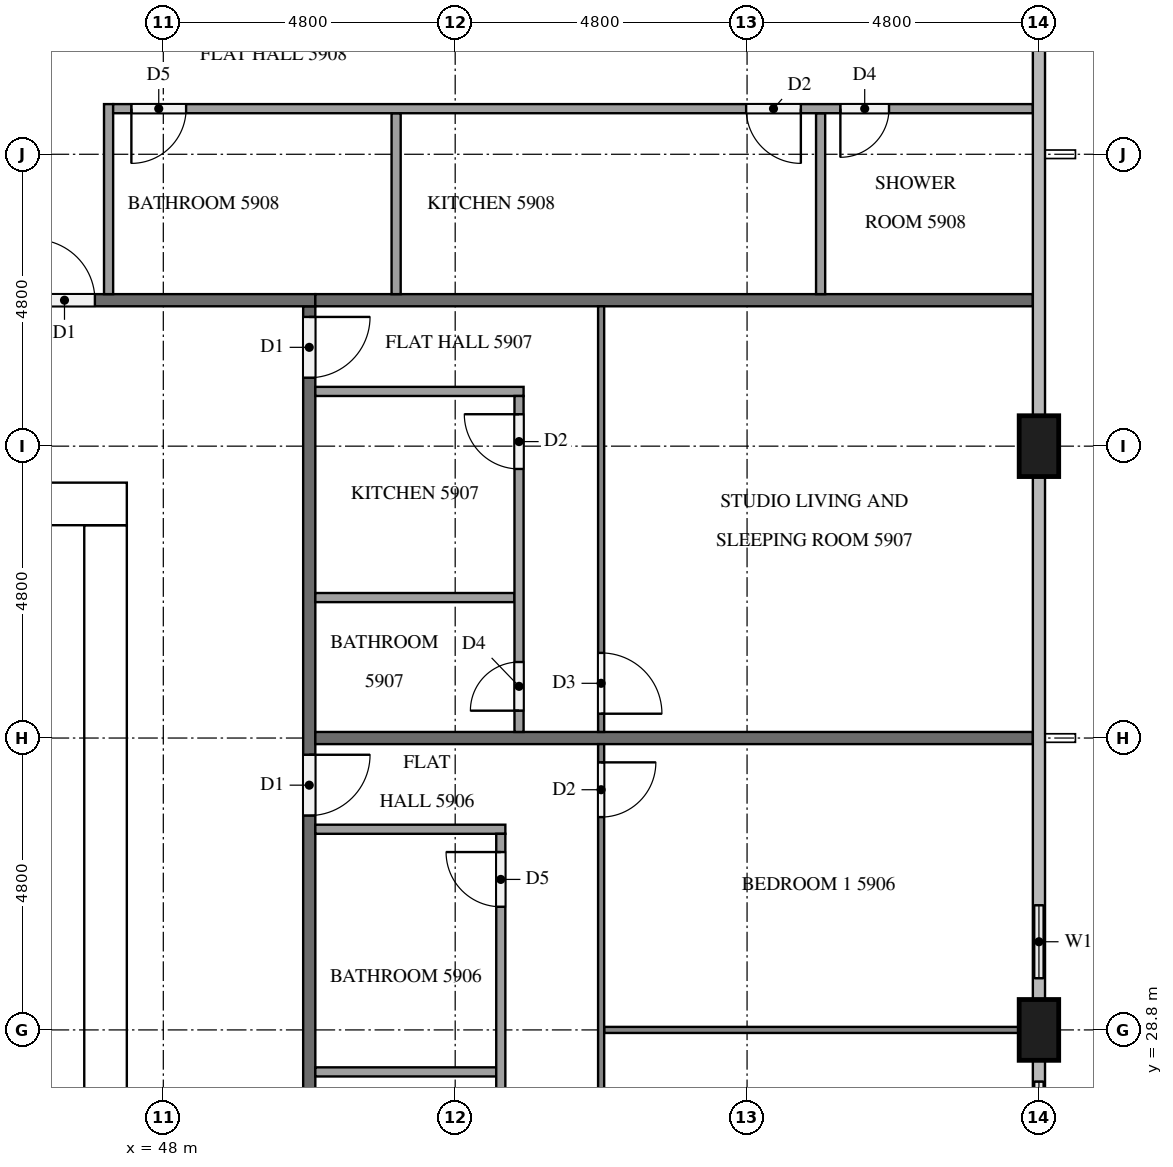
"""IFC4 building model, lengths in metres.
Left out: names, types, materials, properties, quantities, classifications, styles, units other than length and angle.
Written with IfcOpenShell. Run it as: python <this file> out.ifc"""

import sys

from ifc_helpers import new_model, si_unit, direction, frame, frame_2d, origin, origin_2d, place, context, subcontext, project, spatial, rectangle, extrude, element, fill, save


model = new_model("IFC4")
c1 = context("Model", 3, precision=1e-05, world=origin(), true_north=direction((0.0, 1.0)))
c2 = subcontext(c1, "Body", "Model", "MODEL_VIEW")
j1 = project(units=[si_unit("LENGTHUNIT", "METRE"), si_unit("PLANEANGLEUNIT", "RADIAN")], contexts=[c1])
p1 = place(None, origin())
s1 = spatial("IfcSite", under=j1, at=p1, CompositionType="ELEMENT")
p2 = place(p1, origin())
s2 = spatial("IfcBuilding", under=s1, at=p2, CompositionType="ELEMENT")
p3 = place(p2, frame((0.0, 0.0, 226.3)))
s3 = spatial("IfcBuildingStorey", under=s2, at=p3, CompositionType="ELEMENT", Elevation=226.3)
p4 = place(p3, frame((15.0, 37.45, 0.0), z_axis=(0.0, 0.0, 1.0), x_axis=(1.0, 0.0, 0.0)))
e1 = element("IfcWall", 1, at=p4, inside=s3, PredefinedType="SHEAR", context=c2, shape_type="SweptSolid", body=[
    extrude(rectangle(XDim=32.4, YDim=0.7, at=frame_2d((16.2, 0.0))), origin(), (0.0, 0.0, 1.0), 3.2),
])
p5 = place(p4, frame((15.3, 0.0, 0.0)))
e2 = element("IfcOpeningElement", 2, at=p5, cuts=e1, PredefinedType="OPENING", context=c2, shape_type="SweptSolid", body=[
    extrude(rectangle(XDim=1.8, YDim=2.1, at=frame_2d((0.9, 1.05))), frame((0.0, 0.36, 0.0), z_axis=(0.0, -1.0, 0.0), x_axis=(1.0, 0.0, 0.0)), (0.0, 0.0, 1.0), 0.72),
])
p6 = place(p4, frame((1.544, 0.0, 0.0)))
e3 = element("IfcOpeningElement", 3, at=p6, cuts=e1, PredefinedType="OPENING", context=c2, shape_type="SweptSolid", body=[
    extrude(rectangle(XDim=1.0, YDim=2.1, at=frame_2d((0.5, 1.05))), frame((0.0, 0.36, 0.0), z_axis=(0.0, -1.0, 0.0), x_axis=(1.0, 0.0, 0.0)), (0.0, 0.0, 1.0), 0.72),
])
p7 = place(p4, frame((5.219, 0.0, 0.0)))
e4 = element("IfcOpeningElement", 4, at=p7, cuts=e1, PredefinedType="OPENING", context=c2, shape_type="SweptSolid", body=[
    extrude(rectangle(XDim=1.0, YDim=2.1, at=frame_2d((0.5, 1.05))), frame((0.0, 0.36, 0.0), z_axis=(0.0, -1.0, 0.0), x_axis=(1.0, 0.0, 0.0)), (0.0, 0.0, 1.0), 0.72),
])
p8 = place(p3, frame((47.05, 15.7, 0.0), z_axis=(0.0, 0.0, 1.0), x_axis=(0.0, 1.0, 0.0)))
e5 = element("IfcWall", 5, at=p8, inside=s3, PredefinedType="SHEAR", context=c2, shape_type="SweptSolid", body=[
    extrude(rectangle(XDim=21.4, YDim=0.7, at=frame_2d((10.7, 0.0))), origin(), (0.0, 0.0, 1.0), 3.2),
])
p9 = place(p8, frame((10.4, 0.0, 0.0)))
e6 = element("IfcOpeningElement", 6, at=p9, cuts=e5, PredefinedType="OPENING", context=c2, shape_type="SweptSolid", body=[
    extrude(rectangle(XDim=1.2, YDim=2.1, at=frame_2d((0.6, 1.05))), frame((0.0, 0.36, 0.0), z_axis=(0.0, -1.0, 0.0), x_axis=(1.0, 0.0, 0.0)), (0.0, 0.0, 1.0), 0.72),
])
for number, where, z_axis, x_axis in (
    (7, (62.4, 28.8, 0.0), (0.0, 0.0, 1.0), (0.0, 1.0, 0.0)),
    (8, (62.4, 38.4, 0.0), (0.0, 0.0, 1.0), (0.0, 1.0, 0.0)),
):
    element("IfcColumn", number, at=place(p3, frame(where, z_axis=z_axis, x_axis=x_axis)), inside=s3, PredefinedType="COLUMN", context=c2, shape_type="SweptSolid", body=[
        extrude(rectangle(XDim=1.0, YDim=0.65, at=origin_2d()), origin(), (0.0, 0.0, 1.0), 3.2),
    ])
p10 = place(p3, frame((62.4, 26.4, 0.0), z_axis=(0.0, 0.0, 1.0), x_axis=(0.0, 1.0, 0.0)))
e9 = element("IfcWall", 9, at=p10, inside=s3, PredefinedType="SOLIDWALL", context=c2, shape_type="SweptSolid", body=[
    extrude(rectangle(XDim=1.9, YDim=0.15, at=frame_2d((0.95, 0.0))), origin(), (0.0, 0.0, 1.0), 3.2),
])
p11 = place(p10, frame((0.35, 0.0, 0.9)))
e10 = element("IfcOpeningElement", 10, at=p11, cuts=e9, PredefinedType="OPENING", context=c2, shape_type="SweptSolid", body=[
    extrude(rectangle(XDim=1.2, YDim=1.4, at=frame_2d((0.6, 0.7))), frame((0.0, 0.085, 0.0), z_axis=(0.0, -1.0, 0.0), x_axis=(1.0, 0.0, 0.0)), (0.0, 0.0, 1.0), 0.17),
])
p12 = place(p3, frame((62.4, 29.3, 0.0), z_axis=(0.0, 0.0, 1.0), x_axis=(0.0, 1.0, 0.0)))
e11 = element("IfcWall", 11, at=p12, inside=s3, PredefinedType="SOLIDWALL", context=c2, shape_type="SweptSolid", body=[
    extrude(rectangle(XDim=1.9, YDim=0.15, at=frame_2d((0.95, 0.0))), origin(), (0.0, 0.0, 1.0), 3.2),
])
p13 = place(p12, frame((0.35, 0.0, 0.9)))
e12 = element("IfcOpeningElement", 12, at=p13, cuts=e11, PredefinedType="OPENING", context=c2, shape_type="SweptSolid", body=[
    extrude(rectangle(XDim=1.2, YDim=1.4, at=frame_2d((0.6, 0.7))), frame((0.0, 0.085, 0.0), z_axis=(0.0, -1.0, 0.0), x_axis=(1.0, 0.0, 0.0)), (0.0, 0.0, 1.0), 0.17),
])
p14 = place(p3, frame((50.4, 40.7, 0.0), z_axis=(0.0, 0.0, 1.0), x_axis=(0.0, -1.0, 0.0)))
e13 = element("IfcWall", 13, at=p14, inside=s3, PredefinedType="PARTITIONING", context=c2, shape_type="SweptSolid", body=[
    extrude(rectangle(XDim=28.6, YDim=0.2, at=frame_2d((14.3, 0.0))), origin(), (0.0, 0.0, 1.0), 3.2),
])
p15 = place(p14, frame((21.775, 0.0, 0.0)))
e14 = element("IfcOpeningElement", 14, at=p15, cuts=e13, PredefinedType="OPENING", context=c2, shape_type="SweptSolid", body=[
    extrude(rectangle(XDim=1.0, YDim=2.1, at=frame_2d((0.5, 1.05))), frame((0.0, 0.11, 0.0), z_axis=(0.0, -1.0, 0.0), x_axis=(1.0, 0.0, 0.0)), (0.0, 0.0, 1.0), 0.22),
])
p16 = place(p14, frame((7.375, 0.0, 0.0)))
e15 = element("IfcOpeningElement", 15, at=p16, cuts=e13, PredefinedType="OPENING", context=c2, shape_type="SweptSolid", body=[
    extrude(rectangle(XDim=1.0, YDim=2.1, at=frame_2d((0.5, 1.05))), frame((0.0, 0.11, 0.0), z_axis=(0.0, -1.0, 0.0), x_axis=(1.0, 0.0, 0.0)), (0.0, 0.0, 1.0), 0.22),
])
p17 = place(p14, frame((0.175, 0.0, 0.0)))
e16 = element("IfcOpeningElement", 16, at=p17, cuts=e13, PredefinedType="OPENING", context=c2, shape_type="SweptSolid", body=[
    extrude(rectangle(XDim=1.0, YDim=2.1, at=frame_2d((0.5, 1.05))), frame((0.0, 0.11, 0.0), z_axis=(0.0, -1.0, 0.0), x_axis=(1.0, 0.0, 0.0)), (0.0, 0.0, 1.0), 0.22),
])
p18 = place(p3, frame((11.9, 40.8, 0.0), z_axis=(0.0, 0.0, 1.0), x_axis=(1.0, 0.0, 0.0)))
e17 = element("IfcWall", 17, at=p18, inside=s3, PredefinedType="PARTITIONING", context=c2, shape_type="SweptSolid", body=[
    extrude(rectangle(XDim=38.6, YDim=0.2, at=frame_2d((19.3, 0.0))), origin(), (0.0, 0.0, 1.0), 3.2),
])
p19 = place(p18, frame((33.975, 0.0, 0.0)))
e18 = element("IfcOpeningElement", 18, at=p19, cuts=e17, PredefinedType="OPENING", context=c2, shape_type="SweptSolid", body=[
    extrude(rectangle(XDim=1.0, YDim=2.1, at=frame_2d((0.5, 1.05))), frame((0.0, 0.11, 0.0), z_axis=(0.0, -1.0, 0.0), x_axis=(1.0, 0.0, 0.0)), (0.0, 0.0, 1.0), 0.22),
])
p20 = place(p18, frame((14.725, 0.0, 0.0)))
e19 = element("IfcOpeningElement", 19, at=p20, cuts=e17, PredefinedType="OPENING", context=c2, shape_type="SweptSolid", body=[
    extrude(rectangle(XDim=1.1, YDim=2.1, at=frame_2d((0.55, 1.05))), frame((0.0, 0.11, 0.0), z_axis=(0.0, -1.0, 0.0), x_axis=(1.0, 0.0, 0.0)), (0.0, 0.0, 1.0), 0.22),
])
p21 = place(p18, frame((7.575, 0.0, 0.0)))
e20 = element("IfcOpeningElement", 20, at=p21, cuts=e17, PredefinedType="OPENING", context=c2, shape_type="SweptSolid", body=[
    extrude(rectangle(XDim=1.0, YDim=2.1, at=frame_2d((0.5, 1.05))), frame((0.0, 0.11, 0.0), z_axis=(0.0, -1.0, 0.0), x_axis=(1.0, 0.0, 0.0)), (0.0, 0.0, 1.0), 0.22),
])
p22 = place(p18, frame((6.025, 0.0, 0.0)))
e21 = element("IfcOpeningElement", 21, at=p22, cuts=e17, PredefinedType="OPENING", context=c2, shape_type="SweptSolid", body=[
    extrude(rectangle(XDim=1.0, YDim=2.1, at=frame_2d((0.5, 1.05))), frame((0.0, 0.11, 0.0), z_axis=(0.0, -1.0, 0.0), x_axis=(1.0, 0.0, 0.0)), (0.0, 0.0, 1.0), 0.22),
])
for number, where, z_axis, x_axis in (
    (22, (50.5, 33.6, 0.0), (0.0, 0.0, 1.0), (1.0, 0.0, 0.0)),
    (23, (50.5, 40.8, 0.0), (0.0, 0.0, 1.0), (1.0, 0.0, 0.0)),
):
    element("IfcWall", number, at=place(p3, frame(where, z_axis=z_axis, x_axis=x_axis)), inside=s3, PredefinedType="PARTITIONING", context=c2, shape_type="SweptSolid", body=[
        extrude(rectangle(XDim=11.8, YDim=0.2, at=frame_2d((5.9, 0.0))), origin(), (0.0, 0.0, 1.0), 3.2),
    ])
p23 = place(p3, frame((55.25, 28.8, 0.0), z_axis=(0.0, 0.0, 1.0), x_axis=(1.0, 0.0, 0.0)))
e24 = element("IfcWall", 24, at=p23, inside=s3, PredefinedType="PARTITIONING", context=c2, shape_type="SweptSolid", body=[
    extrude(rectangle(XDim=6.825, YDim=0.1, at=frame_2d((3.413, 0.0))), origin(), (0.0, 0.0, 1.0), 3.2),
])
p24 = place(p3, frame((55.2, 33.5, 0.0), z_axis=(0.0, 0.0, 1.0), x_axis=(0.0, -1.0, 0.0)))
e25 = element("IfcWall", 25, at=p24, inside=s3, PredefinedType="PARTITIONING", context=c2, shape_type="SweptSolid", body=[
    extrude(rectangle(XDim=14.2, YDim=0.1, at=frame_2d((7.1, 0.0))), origin(), (0.0, 0.0, 1.0), 3.2),
])
p25 = place(p24, frame((0.3, 0.0, 0.0)))
e26 = element("IfcOpeningElement", 26, at=p25, cuts=e25, PredefinedType="OPENING", context=c2, shape_type="SweptSolid", body=[
    extrude(rectangle(XDim=0.9, YDim=2.1, at=frame_2d((0.45, 1.05))), frame((0.0, 0.06, 0.0), z_axis=(0.0, -1.0, 0.0), x_axis=(1.0, 0.0, 0.0)), (0.0, 0.0, 1.0), 0.12),
])
p26 = place(p24, frame((8.25, 0.0, 0.0)))
e27 = element("IfcOpeningElement", 27, at=p26, cuts=e25, PredefinedType="OPENING", context=c2, shape_type="SweptSolid", body=[
    extrude(rectangle(XDim=0.9, YDim=2.1, at=frame_2d((0.45, 1.05))), frame((0.0, 0.06, 0.0), z_axis=(0.0, -1.0, 0.0), x_axis=(1.0, 0.0, 0.0)), (0.0, 0.0, 1.0), 0.12),
])
p27 = place(p24, frame((9.85, 0.0, 0.0)))
e28 = element("IfcOpeningElement", 28, at=p27, cuts=e25, PredefinedType="OPENING", context=c2, shape_type="SweptSolid", body=[
    extrude(rectangle(XDim=1.0, YDim=2.1, at=frame_2d((0.5, 1.05))), frame((0.0, 0.06, 0.0), z_axis=(0.0, -1.0, 0.0), x_axis=(1.0, 0.0, 0.0)), (0.0, 0.0, 1.0), 0.12),
])
p28 = place(p3, frame((50.5, 28.11, 0.0), z_axis=(0.0, 0.0, 1.0), x_axis=(1.0, 0.0, 0.0)))
e29 = element("IfcWall", 29, at=p28, inside=s3, PredefinedType="PARTITIONING", context=c2, shape_type="SweptSolid", body=[
    extrude(rectangle(XDim=2.975, YDim=0.15, at=frame_2d((1.488, 0.0))), origin(), (0.0, 0.0, 1.0), 3.2),
])
p29 = place(p3, frame((50.5, 32.1, 0.0), z_axis=(0.0, 0.0, 1.0), x_axis=(1.0, 0.0, 0.0)))
e30 = element("IfcWall", 30, at=p29, inside=s3, PredefinedType="PARTITIONING", context=c2, shape_type="SweptSolid", body=[
    extrude(rectangle(XDim=3.125, YDim=0.15, at=frame_2d((1.562, 0.0))), origin(), (0.0, 0.0, 1.0), 3.2),
])
p30 = place(p3, frame((53.55, 19.3, 0.0), z_axis=(0.0, 0.0, 1.0), x_axis=(0.0, 1.0, 0.0)))
e31 = element("IfcWall", 31, at=p30, inside=s3, PredefinedType="PARTITIONING", context=c2, shape_type="SweptSolid", body=[
    extrude(rectangle(XDim=12.725, YDim=0.15, at=frame_2d((6.362, 0.0))), origin(), (0.0, 0.0, 1.0), 3.2),
])
p31 = place(p30, frame((11.525, 0.0, 0.0)))
e32 = element("IfcOpeningElement", 32, at=p31, cuts=e31, PredefinedType="OPENING", context=c2, shape_type="SweptSolid", body=[
    extrude(rectangle(XDim=0.9, YDim=2.1, at=frame_2d((0.45, 1.05))), frame((0.0, 0.085, 0.0), z_axis=(0.0, -1.0, 0.0), x_axis=(1.0, 0.0, 0.0)), (0.0, 0.0, 1.0), 0.17),
])
p32 = place(p30, frame((3.261, 0.0, 0.0)))
e33 = element("IfcOpeningElement", 33, at=p32, cuts=e31, PredefinedType="OPENING", context=c2, shape_type="SweptSolid", body=[
    extrude(rectangle(XDim=0.9, YDim=2.1, at=frame_2d((0.45, 1.05))), frame((0.0, 0.085, 0.0), z_axis=(0.0, -1.0, 0.0), x_axis=(1.0, 0.0, 0.0)), (0.0, 0.0, 1.0), 0.17),
])
p33 = place(p30, frame((1.812, 0.0, 0.0)))
e34 = element("IfcOpeningElement", 34, at=p33, cuts=e31, PredefinedType="OPENING", context=c2, shape_type="SweptSolid", body=[
    extrude(rectangle(XDim=0.8, YDim=2.1, at=frame_2d((0.4, 1.05))), frame((0.0, 0.085, 0.0), z_axis=(0.0, -1.0, 0.0), x_axis=(1.0, 0.0, 0.0)), (0.0, 0.0, 1.0), 0.17),
])
p34 = place(p3, frame((55.2, 40.7, 0.0), z_axis=(0.0, 0.0, 1.0), x_axis=(0.0, -1.0, 0.0)))
e35 = element("IfcWall", 35, at=p34, inside=s3, PredefinedType="PARTITIONING", context=c2, shape_type="SweptSolid", body=[
    extrude(rectangle(XDim=7.0, YDim=0.1, at=frame_2d((3.5, 0.0))), origin(), (0.0, 0.0, 1.0), 3.2),
])
p35 = place(p34, frame((5.7, 0.0, 0.0)))
e36 = element("IfcOpeningElement", 36, at=p35, cuts=e35, PredefinedType="OPENING", context=c2, shape_type="SweptSolid", body=[
    extrude(rectangle(XDim=1.0, YDim=2.1, at=frame_2d((0.5, 1.05))), frame((0.0, 0.06, 0.0), z_axis=(0.0, -1.0, 0.0), x_axis=(1.0, 0.0, 0.0)), (0.0, 0.0, 1.0), 0.12),
])
p36 = place(p3, frame((50.5, 35.91, 0.0), z_axis=(0.0, 0.0, 1.0), x_axis=(1.0, 0.0, 0.0)))
e37 = element("IfcWall", 37, at=p36, inside=s3, PredefinedType="PARTITIONING", context=c2, shape_type="SweptSolid", body=[
    extrude(rectangle(XDim=3.275, YDim=0.15, at=frame_2d((1.637, 0.0))), origin(), (0.0, 0.0, 1.0), 3.2),
])
p37 = place(p3, frame((50.5, 39.3, 0.0), z_axis=(0.0, 0.0, 1.0), x_axis=(1.0, 0.0, 0.0)))
e38 = element("IfcWall", 38, at=p37, inside=s3, PredefinedType="PARTITIONING", context=c2, shape_type="SweptSolid", body=[
    extrude(rectangle(XDim=3.425, YDim=0.15, at=frame_2d((1.712, 0.0))), origin(), (0.0, 0.0, 1.0), 3.2),
])
p38 = place(p3, frame((53.85, 33.7, 0.0), z_axis=(0.0, 0.0, 1.0), x_axis=(0.0, 1.0, 0.0)))
e39 = element("IfcWall", 39, at=p38, inside=s3, PredefinedType="PARTITIONING", context=c2, shape_type="SweptSolid", body=[
    extrude(rectangle(XDim=5.525, YDim=0.15, at=frame_2d((2.763, 0.0))), origin(), (0.0, 0.0, 1.0), 3.2),
])
p39 = place(p38, frame((4.325, 0.0, 0.0)))
e40 = element("IfcOpeningElement", 40, at=p39, cuts=e39, PredefinedType="OPENING", context=c2, shape_type="SweptSolid", body=[
    extrude(rectangle(XDim=0.9, YDim=2.1, at=frame_2d((0.45, 1.05))), frame((0.0, 0.085, 0.0), z_axis=(0.0, -1.0, 0.0), x_axis=(1.0, 0.0, 0.0)), (0.0, 0.0, 1.0), 0.17),
])
p40 = place(p38, frame((0.35, 0.0, 0.0)))
e41 = element("IfcOpeningElement", 41, at=p40, cuts=e39, PredefinedType="OPENING", context=c2, shape_type="SweptSolid", body=[
    extrude(rectangle(XDim=0.8, YDim=2.1, at=frame_2d((0.4, 1.05))), frame((0.0, 0.085, 0.0), z_axis=(0.0, -1.0, 0.0), x_axis=(1.0, 0.0, 0.0)), (0.0, 0.0, 1.0), 0.17),
])
for number, where, z_axis, x_axis in (
    (42, (51.829, 40.9, 0.0), (0.0, 0.0, 1.0), (0.0, 1.0, 0.0)),
    (43, (58.81, 40.9, 0.0), (0.0, 0.0, 1.0), (0.0, 1.0, 0.0)),
):
    element("IfcWall", number, at=place(p3, frame(where, z_axis=z_axis, x_axis=x_axis)), inside=s3, PredefinedType="PARTITIONING", context=c2, shape_type="SweptSolid", body=[
        extrude(rectangle(XDim=2.975, YDim=0.15, at=frame_2d((1.488, 0.0))), origin(), (0.0, 0.0, 1.0), 3.2),
    ])
p41 = place(p3, frame((47.1, 40.9, 0.0), z_axis=(0.0, 0.0, 1.0), x_axis=(0.0, 1.0, 0.0)))
e44 = element("IfcWall", 44, at=p41, inside=s3, PredefinedType="PARTITIONING", context=c2, shape_type="SweptSolid", body=[
    extrude(rectangle(XDim=3.125, YDim=0.15, at=frame_2d((1.562, 0.0))), origin(), (0.0, 0.0, 1.0), 3.2),
])
p42 = place(p3, frame((62.3, 43.95, 0.0), z_axis=(0.0, 0.0, 1.0), x_axis=(-1.0, 0.0, 0.0)))
e45 = element("IfcWall", 45, at=p42, inside=s3, PredefinedType="PARTITIONING", context=c2, shape_type="SweptSolid", body=[
    extrude(rectangle(XDim=15.125, YDim=0.15, at=frame_2d((7.562, 0.0))), origin(), (0.0, 0.0, 1.0), 3.2),
])
p43 = place(p42, frame((13.925, 0.0, 0.0)))
e46 = element("IfcOpeningElement", 46, at=p43, cuts=e45, PredefinedType="OPENING", context=c2, shape_type="SweptSolid", body=[
    extrude(rectangle(XDim=0.9, YDim=2.1, at=frame_2d((0.45, 1.05))), frame((0.0, 0.085, 0.0), z_axis=(0.0, -1.0, 0.0), x_axis=(1.0, 0.0, 0.0)), (0.0, 0.0, 1.0), 0.17),
])
p44 = place(p42, frame((3.815, 0.0, 0.0)))
e47 = element("IfcOpeningElement", 47, at=p44, cuts=e45, PredefinedType="OPENING", context=c2, shape_type="SweptSolid", body=[
    extrude(rectangle(XDim=0.9, YDim=2.1, at=frame_2d((0.45, 1.05))), frame((0.0, 0.085, 0.0), z_axis=(0.0, -1.0, 0.0), x_axis=(1.0, 0.0, 0.0)), (0.0, 0.0, 1.0), 0.17),
])
p45 = place(p42, frame((2.365, 0.0, 0.0)))
e48 = element("IfcOpeningElement", 48, at=p45, cuts=e45, PredefinedType="OPENING", context=c2, shape_type="SweptSolid", body=[
    extrude(rectangle(XDim=0.8, YDim=2.1, at=frame_2d((0.4, 1.05))), frame((0.0, 0.085, 0.0), z_axis=(0.0, -1.0, 0.0), x_axis=(1.0, 0.0, 0.0)), (0.0, 0.0, 1.0), 0.17),
])
p46 = place(p11, origin())
e49 = element("IfcWindow", 49, at=p46, inside=s3, PartitioningType="SINGLE_PANEL", PredefinedType="WINDOW", context=c2, shape_type="SweptSolid", body=[
    extrude(rectangle(XDim=1.2, YDim=1.4, at=frame_2d((0.6, 0.7))), frame((0.0, 0.03, 0.0), z_axis=(0.0, -1.0, 0.0), x_axis=(1.0, 0.0, 0.0)), (0.0, 0.0, 1.0), 0.06),
])
fill(e10, e49)
p47 = place(p13, origin())
e50 = element("IfcWindow", 50, at=p47, inside=s3, PartitioningType="SINGLE_PANEL", PredefinedType="WINDOW", context=c2, shape_type="SweptSolid", body=[
    extrude(rectangle(XDim=1.2, YDim=1.4, at=frame_2d((0.6, 0.7))), frame((0.0, 0.03, 0.0), z_axis=(0.0, -1.0, 0.0), x_axis=(1.0, 0.0, 0.0)), (0.0, 0.0, 1.0), 0.06),
])
fill(e12, e50)
p48 = place(p16, origin())
e51 = element("IfcDoor", 51, at=p48, inside=s3, OperationType="SINGLE_SWING_LEFT", PredefinedType="DOOR", context=c2, shape_type="SweptSolid", body=[
    extrude(rectangle(XDim=1.0, YDim=2.1, at=frame_2d((0.5, 1.05))), frame((0.0, 0.025, 0.0), z_axis=(0.0, -1.0, 0.0), x_axis=(1.0, 0.0, 0.0)), (0.0, 0.0, 1.0), 0.05),
])
fill(e15, e51)
p49 = place(p17, origin())
e52 = element("IfcDoor", 52, at=p49, inside=s3, OperationType="SINGLE_SWING_LEFT", PredefinedType="DOOR", context=c2, shape_type="SweptSolid", body=[
    extrude(rectangle(XDim=1.0, YDim=2.1, at=frame_2d((0.5, 1.05))), frame((0.0, 0.025, 0.0), z_axis=(0.0, -1.0, 0.0), x_axis=(1.0, 0.0, 0.0)), (0.0, 0.0, 1.0), 0.05),
])
fill(e16, e52)
p50 = place(p19, origin())
e53 = element("IfcDoor", 53, at=p50, inside=s3, OperationType="SINGLE_SWING_LEFT", PredefinedType="DOOR", context=c2, shape_type="SweptSolid", body=[
    extrude(rectangle(XDim=1.0, YDim=2.1, at=frame_2d((0.5, 1.05))), frame((0.0, 0.025, 0.0), z_axis=(0.0, -1.0, 0.0), x_axis=(1.0, 0.0, 0.0)), (0.0, 0.0, 1.0), 0.05),
])
fill(e18, e53)
p51 = place(p25, origin())
e54 = element("IfcDoor", 54, at=p51, inside=s3, OperationType="SINGLE_SWING_LEFT", PredefinedType="DOOR", context=c2, shape_type="SweptSolid", body=[
    extrude(rectangle(XDim=0.9, YDim=2.1, at=frame_2d((0.45, 1.05))), frame((0.0, 0.025, 0.0), z_axis=(0.0, -1.0, 0.0), x_axis=(1.0, 0.0, 0.0)), (0.0, 0.0, 1.0), 0.05),
])
fill(e26, e54)
p52 = place(p31, origin())
e55 = element("IfcDoor", 55, at=p52, inside=s3, OperationType="SINGLE_SWING_RIGHT", PredefinedType="DOOR", context=c2, shape_type="SweptSolid", body=[
    extrude(rectangle(XDim=0.9, YDim=2.1, at=frame_2d((0.45, 1.05))), frame((0.0, 0.025, 0.0), z_axis=(0.0, -1.0, 0.0), x_axis=(1.0, 0.0, 0.0)), (0.0, 0.0, 1.0), 0.05),
])
fill(e32, e55)
p53 = place(p35, origin())
e56 = element("IfcDoor", 56, at=p53, inside=s3, OperationType="SINGLE_SWING_RIGHT", PredefinedType="DOOR", context=c2, shape_type="SweptSolid", body=[
    extrude(rectangle(XDim=1.0, YDim=2.1, at=frame_2d((0.5, 1.05))), frame((0.0, 0.025, 0.0), z_axis=(0.0, -1.0, 0.0), x_axis=(1.0, 0.0, 0.0)), (0.0, 0.0, 1.0), 0.05),
])
fill(e36, e56)
p54 = place(p39, origin())
e57 = element("IfcDoor", 57, at=p54, inside=s3, OperationType="SINGLE_SWING_RIGHT", PredefinedType="DOOR", context=c2, shape_type="SweptSolid", body=[
    extrude(rectangle(XDim=0.9, YDim=2.1, at=frame_2d((0.45, 1.05))), frame((0.0, 0.025, 0.0), z_axis=(0.0, -1.0, 0.0), x_axis=(1.0, 0.0, 0.0)), (0.0, 0.0, 1.0), 0.05),
])
fill(e40, e57)
p55 = place(p40, origin())
e58 = element("IfcDoor", 58, at=p55, inside=s3, OperationType="SINGLE_SWING_LEFT", PredefinedType="DOOR", context=c2, shape_type="SweptSolid", body=[
    extrude(rectangle(XDim=0.8, YDim=2.1, at=frame_2d((0.4, 1.05))), frame((0.0, 0.025, 0.0), z_axis=(0.0, -1.0, 0.0), x_axis=(1.0, 0.0, 0.0)), (0.0, 0.0, 1.0), 0.05),
])
fill(e41, e58)
p56 = place(p43, origin())
e59 = element("IfcDoor", 59, at=p56, inside=s3, OperationType="SINGLE_SWING_RIGHT", PredefinedType="DOOR", context=c2, shape_type="SweptSolid", body=[
    extrude(rectangle(XDim=0.9, YDim=2.1, at=frame_2d((0.45, 1.05))), frame((0.0, 0.025, 0.0), z_axis=(0.0, -1.0, 0.0), x_axis=(1.0, 0.0, 0.0)), (0.0, 0.0, 1.0), 0.05),
])
fill(e46, e59)
p57 = place(p44, origin())
e60 = element("IfcDoor", 60, at=p57, inside=s3, OperationType="SINGLE_SWING_LEFT", PredefinedType="DOOR", context=c2, shape_type="SweptSolid", body=[
    extrude(rectangle(XDim=0.9, YDim=2.1, at=frame_2d((0.45, 1.05))), frame((0.0, 0.025, 0.0), z_axis=(0.0, -1.0, 0.0), x_axis=(1.0, 0.0, 0.0)), (0.0, 0.0, 1.0), 0.05),
])
fill(e47, e60)
p58 = place(p45, origin())
e61 = element("IfcDoor", 61, at=p58, inside=s3, OperationType="SINGLE_SWING_RIGHT", PredefinedType="DOOR", context=c2, shape_type="SweptSolid", body=[
    extrude(rectangle(XDim=0.8, YDim=2.1, at=frame_2d((0.4, 1.05))), frame((0.0, 0.025, 0.0), z_axis=(0.0, -1.0, 0.0), x_axis=(1.0, 0.0, 0.0)), (0.0, 0.0, 1.0), 0.05),
])
fill(e48, e61)
save(model, sys.argv[1])
